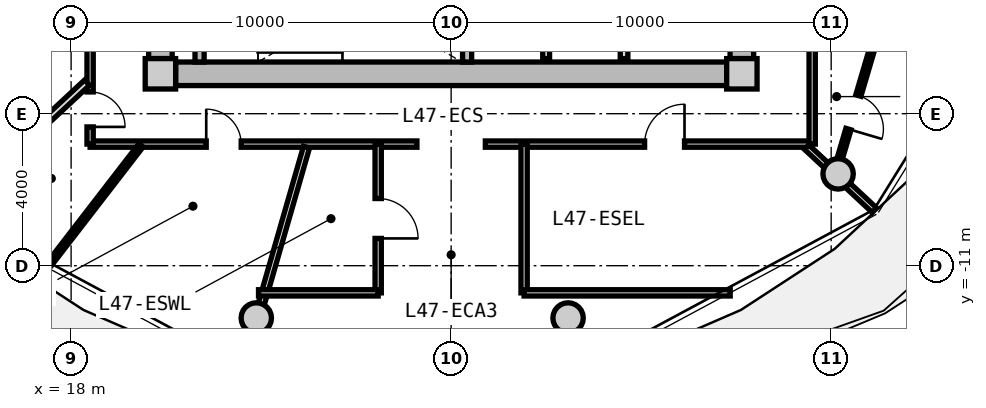
"""IFC4 building model, lengths in metres.
Left out: names, types, materials, properties, quantities, classifications, styles, units other than length and angle.
Written with IfcOpenShell. Run it as: python <this file> out.ifc"""

import sys

from ifc_helpers import new_model, si_unit, direction, frame, frame_2d, origin, origin_2d, place, context, subcontext, project, spatial, rectangle, circle, extrude, source, transform, mapped, element, fill, save


model = new_model("IFC4")
c1 = context("Model", 3, precision=1e-05, world=origin(), true_north=direction((0.0, 1.0)))
c2 = subcontext(c1, "Body", "Model", "MODEL_VIEW")
j1 = project(units=[si_unit("LENGTHUNIT", "METRE"), si_unit("PLANEANGLEUNIT", "RADIAN")], contexts=[c1])
p1 = place(None, origin())
s1 = spatial("IfcSite", under=j1, at=p1, CompositionType="ELEMENT")
p2 = place(p1, origin())
s2 = spatial("IfcBuilding", under=s1, at=p2, CompositionType="ELEMENT")
p3 = place(p2, frame((0.0, 0.0, 152.6)))
s3 = spatial("IfcBuildingStorey", under=s2, at=p3, CompositionType="ELEMENT", Elevation=152.6)
m1 = source(origin(), c2, "Body", "SweptSolid", [
    extrude(rectangle(XDim=0.8, YDim=0.8, at=origin_2d()), origin(), (0.0, 0.0, 1.0), 3.05),
])
for number, where, z_axis, x_axis in (
    (1, (20.35, -5.95, 0.0), (0.0, 0.0, 1.0), (1.0, 0.0, 0.0)),
    (2, (35.65, -5.95, 0.0), (0.0, 0.0, 1.0), (1.0, 0.0, 0.0)),
):
    element("IfcColumn", number, at=place(p3, frame(where, z_axis=z_axis, x_axis=x_axis)), inside=s3, PredefinedType="COLUMN", context=c2, shape_type="MappedRepresentation", body=[
        mapped(m1, transform((0.0, 0.0, 0.0), x_axis=(1.0, 0.0, 0.0), y_axis=(0.0, 1.0, 0.0), z_axis=(0.0, 0.0, 1.0), scale=1.0)),
    ])
m2 = source(origin(), c2, "Body", "SweptSolid", [
    extrude(rectangle(XDim=14.5, YDim=0.62, at=frame_2d((7.25, 0.0))), origin(), (0.0, 0.0, 1.0), 2.81),
])
p4 = place(p3, frame((35.25, -5.95, 0.0), z_axis=(0.0, 0.0, 1.0), x_axis=(-1.0, 0.0, 0.0)))
e3 = element("IfcWall", 3, at=p4, inside=s3, PredefinedType="SHEAR", context=c2, shape_type="MappedRepresentation", body=[
    mapped(m2, transform((0.0, 0.0, 0.0), x_axis=(1.0, 0.0, 0.0), y_axis=(0.0, 1.0, 0.0), z_axis=(0.0, 0.0, 1.0), scale=1.0)),
])
m3 = source(origin(), c2, "Body", "SweptSolid", [
    extrude(rectangle(XDim=11.1, YDim=0.62, at=frame_2d((5.55, 0.0))), origin(), (0.0, 0.0, 1.0), 2.81),
])
p5 = place(p3, frame((20.35, -5.55, 0.0), z_axis=(0.0, 0.0, 1.0), x_axis=(0.0, 1.0, 0.0)))
e4 = element("IfcWall", 4, at=p5, inside=s3, PredefinedType="SHEAR", context=c2, shape_type="MappedRepresentation", body=[
    mapped(m3, transform((0.0, 0.0, 0.0), x_axis=(1.0, 0.0, 0.0), y_axis=(0.0, 1.0, 0.0), z_axis=(0.0, 0.0, 1.0), scale=1.0)),
])
p6 = place(p5, frame((3.8, 0.0, 0.0)))
e5 = element("IfcOpeningElement", 5, at=p6, cuts=e4, PredefinedType="OPENING", context=c2, shape_type="SweptSolid", body=[
    extrude(rectangle(XDim=1.2, YDim=2.15, at=frame_2d((0.6, 1.075))), frame((0.0, 0.32, 0.0), z_axis=(0.0, -1.0, 0.0), x_axis=(1.0, 0.0, 0.0)), (0.0, 0.0, 1.0), 0.64),
])
p7 = place(p3, frame((35.65, 5.55, 0.0), z_axis=(0.0, 0.0, 1.0), x_axis=(0.0, -1.0, 0.0)))
e6 = element("IfcWall", 6, at=p7, inside=s3, PredefinedType="SHEAR", context=c2, shape_type="MappedRepresentation", body=[
    mapped(m3, transform((0.0, 0.0, 0.0), x_axis=(1.0, 0.0, 0.0), y_axis=(0.0, 1.0, 0.0), z_axis=(0.0, 0.0, 1.0), scale=1.0)),
])
p8 = place(p7, frame((5.65, 0.0, 0.0)))
e7 = element("IfcOpeningElement", 7, at=p8, cuts=e6, PredefinedType="OPENING", context=c2, shape_type="SweptSolid", body=[
    extrude(rectangle(XDim=1.2, YDim=2.15, at=frame_2d((0.6, 1.075))), frame((0.0, 0.32, 0.0), z_axis=(0.0, -1.0, 0.0), x_axis=(1.0, 0.0, 0.0)), (0.0, 0.0, 1.0), 0.64),
])
p9 = place(p7, frame((9.3, 0.0, 0.0)))
e8 = element("IfcOpeningElement", 8, at=p9, cuts=e6, PredefinedType="OPENING", context=c2, shape_type="SweptSolid", body=[
    extrude(rectangle(XDim=1.0, YDim=2.1, at=frame_2d((0.5, 1.05))), frame((0.0, 0.32, 0.0), z_axis=(0.0, -1.0, 0.0), x_axis=(1.0, 0.0, 0.0)), (0.0, 0.0, 1.0), 0.64),
])
m4 = source(origin(), c2, "Body", "SweptSolid", [
    extrude(circle(Radius=0.4, at=origin_2d()), origin(), (0.0, 0.0, 1.0), 3.05),
])
for number, where, z_axis, x_axis in (
    (9, (22.873, -12.375, 0.0), (0.0, 0.0, 1.0), (1.0, 0.0, 0.0)),
    (10, (31.077, -12.375, 0.0), (0.0, 0.0, 1.0), (1.0, 0.0, 0.0)),
    (11, (38.183, -8.584, 0.0), (0.0, 0.0, 1.0), (1.0, 0.0, 0.0)),
):
    element("IfcColumn", number, at=place(p3, frame(where, z_axis=z_axis, x_axis=x_axis)), inside=s3, PredefinedType="COLUMN", context=c2, shape_type="MappedRepresentation", body=[
        mapped(m4, transform((0.0, 0.0, 0.0), x_axis=(1.0, 0.0, 0.0), y_axis=(0.0, 1.0, 0.0), z_axis=(0.0, 0.0, 1.0), scale=1.0)),
    ])
m5 = source(origin(), c2, "Body", "SweptSolid", [
    extrude(rectangle(XDim=3.19, YDim=0.24, at=frame_2d((1.595, 0.0))), origin(), (0.0, 0.0, 1.0), 2.81),
])
for number, where, z_axis, x_axis in (
    (12, (21.38, -5.64, 0.0), (0.0, 0.0, 1.0), (0.0, 1.0, 0.0)),
    (13, (28.42, -5.64, 0.0), (0.0, 0.0, 1.0), (0.0, 1.0, 0.0)),
):
    element("IfcWall", number, at=place(p3, frame(where, z_axis=z_axis, x_axis=x_axis)), inside=s3, PredefinedType="PARTITIONING", context=c2, shape_type="MappedRepresentation", body=[
        mapped(m5, transform((0.0, 0.0, 0.0), x_axis=(1.0, 0.0, 0.0), y_axis=(0.0, 1.0, 0.0), z_axis=(0.0, 0.0, 1.0), scale=1.0)),
    ])
m6 = source(origin(), c2, "Body", "SweptSolid", [
    extrude(rectangle(XDim=3.8, YDim=0.2, at=frame_2d((1.9, 0.0))), origin(), (0.0, 0.0, 1.0), 2.795),
])
p10 = place(p3, frame((32.55, -5.55, 0.0), z_axis=(0.0, 0.0, 1.0), x_axis=(0.0, 1.0, 0.0)))
e14 = element("IfcWall", 14, at=p10, inside=s3, PredefinedType="PARTITIONING", context=c2, shape_type="MappedRepresentation", body=[
    mapped(m6, transform((0.0, 0.0, 0.0), x_axis=(1.0, 0.0, 0.0), y_axis=(0.0, 1.0, 0.0), z_axis=(0.0, 0.0, 1.0), scale=1.0)),
])
m7 = source(origin(), c2, "Body", "SweptSolid", [
    extrude(rectangle(XDim=3.22, YDim=0.18, at=frame_2d((1.61, 0.0))), origin(), (0.0, 0.0, 1.0), 2.795),
])
p11 = place(p3, frame((30.5, -5.55, 0.0), z_axis=(0.0, 0.0, 1.0), x_axis=(0.0, 1.0, 0.0)))
e15 = element("IfcWall", 15, at=p11, inside=s3, PredefinedType="PARTITIONING", context=c2, shape_type="MappedRepresentation", body=[
    mapped(m7, transform((0.0, 0.0, 0.0), x_axis=(1.0, 0.0, 0.0), y_axis=(0.0, 1.0, 0.0), z_axis=(0.0, 0.0, 1.0), scale=1.0)),
])
m8 = source(origin(), c2, "Body", "SweptSolid", [
    extrude(rectangle(XDim=8.6, YDim=0.165, at=frame_2d((4.3, 0.0))), origin(), (0.0, 0.0, 1.0), 2.795),
])
p12 = place(p3, frame((37.5, -7.8, 0.0), z_axis=(0.0, 0.0, 1.0), x_axis=(-1.0, 0.0, 0.0)))
e16 = element("IfcWall", 16, at=p12, inside=s3, PredefinedType="PARTITIONING", context=c2, shape_type="MappedRepresentation", body=[
    mapped(m8, transform((0.0, 0.0, 0.0), x_axis=(1.0, 0.0, 0.0), y_axis=(0.0, 1.0, 0.0), z_axis=(0.0, 0.0, 1.0), scale=1.0)),
])
p13 = place(p12, frame((3.359, 0.0, 0.0)))
e17 = element("IfcOpeningElement", 17, at=p13, cuts=e16, PredefinedType="OPENING", context=c2, shape_type="SweptSolid", body=[
    extrude(rectangle(XDim=1.05, YDim=2.15, at=frame_2d((0.525, 1.075))), frame((0.0, 0.093, 0.0), z_axis=(0.0, -1.0, 0.0), x_axis=(1.0, 0.0, 0.0)), (0.0, 0.0, 1.0), 0.185),
])
p14 = place(p3, frame((27.1, -7.8, 0.0), z_axis=(0.0, 0.0, 1.0), x_axis=(-1.0, 0.0, 0.0)))
e18 = element("IfcWall", 18, at=p14, inside=s3, PredefinedType="PARTITIONING", context=c2, shape_type="MappedRepresentation", body=[
    mapped(m8, transform((0.0, 0.0, 0.0), x_axis=(1.0, 0.0, 0.0), y_axis=(0.0, 1.0, 0.0), z_axis=(0.0, 0.0, 1.0), scale=1.0)),
])
p15 = place(p14, frame((4.625, 0.0, 0.0)))
e19 = element("IfcOpeningElement", 19, at=p15, cuts=e18, PredefinedType="OPENING", context=c2, shape_type="SweptSolid", body=[
    extrude(rectangle(XDim=0.92, YDim=2.1, at=frame_2d((0.46, 1.05))), frame((0.0, 0.093, 0.0), z_axis=(0.0, -1.0, 0.0), x_axis=(1.0, 0.0, 0.0)), (0.0, 0.0, 1.0), 0.185),
])
m9 = source(origin(), c2, "Body", "SweptSolid", [
    extrude(rectangle(XDim=15.6, YDim=0.165, at=frame_2d((7.8, 0.0))), origin(), (0.0, 0.0, 1.0), 2.795),
])
p16 = place(p3, frame((18.5, -7.8, 0.0), z_axis=(0.0, 0.0, 1.0), x_axis=(0.0, 1.0, 0.0)))
e20 = element("IfcWall", 20, at=p16, inside=s3, PredefinedType="PARTITIONING", context=c2, shape_type="MappedRepresentation", body=[
    mapped(m9, transform((0.0, 0.0, 0.0), x_axis=(1.0, 0.0, 0.0), y_axis=(0.0, 1.0, 0.0), z_axis=(0.0, 0.0, 1.0), scale=1.0)),
])
p17 = place(p16, frame((12.591, 0.0, 0.0)))
e21 = element("IfcOpeningElement", 21, at=p17, cuts=e20, PredefinedType="OPENING", context=c2, shape_type="SweptSolid", body=[
    extrude(rectangle(XDim=1.05, YDim=2.15, at=frame_2d((0.525, 1.075))), frame((0.0, 0.093, 0.0), z_axis=(0.0, -1.0, 0.0), x_axis=(1.0, 0.0, 0.0)), (0.0, 0.0, 1.0), 0.185),
])
p18 = place(p16, frame((8.081, 0.0, 0.0)))
e22 = element("IfcOpeningElement", 22, at=p18, cuts=e20, PredefinedType="OPENING", context=c2, shape_type="SweptSolid", body=[
    extrude(rectangle(XDim=1.05, YDim=2.15, at=frame_2d((0.525, 1.075))), frame((0.0, 0.093, 0.0), z_axis=(0.0, -1.0, 0.0), x_axis=(1.0, 0.0, 0.0)), (0.0, 0.0, 1.0), 0.185),
])
p19 = place(p16, frame((2.854, 0.0, 0.0)))
e23 = element("IfcOpeningElement", 23, at=p19, cuts=e20, PredefinedType="OPENING", context=c2, shape_type="SweptSolid", body=[
    extrude(rectangle(XDim=1.05, YDim=2.15, at=frame_2d((0.525, 1.075))), frame((0.0, 0.093, 0.0), z_axis=(0.0, -1.0, 0.0), x_axis=(1.0, 0.0, 0.0)), (0.0, 0.0, 1.0), 0.185),
])
p20 = place(p16, frame((0.452, 0.0, 0.0)))
e24 = element("IfcOpeningElement", 24, at=p20, cuts=e20, PredefinedType="OPENING", context=c2, shape_type="SweptSolid", body=[
    extrude(rectangle(XDim=0.92, YDim=2.1, at=frame_2d((0.46, 1.05))), frame((0.0, 0.093, 0.0), z_axis=(0.0, -1.0, 0.0), x_axis=(1.0, 0.0, 0.0)), (0.0, 0.0, 1.0), 0.185),
])
p21 = place(p3, frame((37.5, 7.8, 0.0), z_axis=(0.0, 0.0, 1.0), x_axis=(0.0, -1.0, 0.0)))
e25 = element("IfcWall", 25, at=p21, inside=s3, PredefinedType="PARTITIONING", context=c2, shape_type="MappedRepresentation", body=[
    mapped(m9, transform((0.0, 0.0, 0.0), x_axis=(1.0, 0.0, 0.0), y_axis=(0.0, 1.0, 0.0), z_axis=(0.0, 0.0, 1.0), scale=1.0)),
])
p22 = place(p21, frame((9.896, 0.0, 0.0)))
e26 = element("IfcOpeningElement", 26, at=p22, cuts=e25, PredefinedType="OPENING", context=c2, shape_type="SweptSolid", body=[
    extrude(rectangle(XDim=1.05, YDim=2.15, at=frame_2d((0.525, 1.075))), frame((0.0, 0.093, 0.0), z_axis=(0.0, -1.0, 0.0), x_axis=(1.0, 0.0, 0.0)), (0.0, 0.0, 1.0), 0.185),
])
p23 = place(p21, frame((4.306, 0.0, 0.0)))
e27 = element("IfcOpeningElement", 27, at=p23, cuts=e25, PredefinedType="OPENING", context=c2, shape_type="SweptSolid", body=[
    extrude(rectangle(XDim=1.05, YDim=2.15, at=frame_2d((0.525, 1.075))), frame((0.0, 0.093, 0.0), z_axis=(0.0, -1.0, 0.0), x_axis=(1.0, 0.0, 0.0)), (0.0, 0.0, 1.0), 0.185),
])
m10 = source(origin(), c2, "Body", "SweptSolid", [
    extrude(rectangle(XDim=6.035, YDim=0.165, at=frame_2d((3.018, 0.0))), origin(), (0.0, 0.0, 1.0), 2.345),
])
p24 = place(p3, frame((24.194, -7.88, 0.0), z_axis=(0.0, 0.0, 1.0), x_axis=(-0.276809454862, -0.960924828329, 0.0)))
e28 = element("IfcWall", 28, at=p24, inside=s3, PredefinedType="PARTITIONING", context=c2, shape_type="MappedRepresentation", body=[
    mapped(m10, transform((0.0, 0.0, 0.0), x_axis=(1.0, 0.0, 0.0), y_axis=(0.0, 1.0, 0.0), z_axis=(0.0, 0.0, 1.0), scale=1.0)),
])
m11 = source(origin(), c2, "Body", "SweptSolid", [
    extrude(rectangle(XDim=2.435, YDim=0.165, at=frame_2d((1.217, 0.0))), origin(), (0.0, 0.0, 1.0), 2.345),
])
p25 = place(p3, frame((37.354, -7.88, 0.0), z_axis=(0.0, 0.0, 1.0), x_axis=(0.732164643118, -0.681127693878, 0.0)))
e29 = element("IfcWall", 29, at=p25, inside=s3, PredefinedType="PARTITIONING", context=c2, shape_type="MappedRepresentation", body=[
    mapped(m11, transform((0.0, 0.0, 0.0), x_axis=(1.0, 0.0, 0.0), y_axis=(0.0, 1.0, 0.0), z_axis=(0.0, 0.0, 1.0), scale=1.0)),
])
m12 = source(origin(), c2, "Body", "SweptSolid", [
    extrude(rectangle(XDim=3.915, YDim=0.165, at=frame_2d((1.957, 0.0))), origin(), (0.0, 0.0, 1.0), 2.795),
])
p26 = place(p3, frame((26.08, -11.715, 0.0), z_axis=(0.0, 0.0, 1.0), x_axis=(0.0, 1.0, 0.0)))
e30 = element("IfcWall", 30, at=p26, inside=s3, PredefinedType="PARTITIONING", context=c2, shape_type="MappedRepresentation", body=[
    mapped(m12, transform((0.0, 0.0, 0.0), x_axis=(1.0, 0.0, 0.0), y_axis=(0.0, 1.0, 0.0), z_axis=(0.0, 0.0, 1.0), scale=1.0)),
])
p27 = place(p26, frame((1.432, 0.0, 0.0)))
e31 = element("IfcOpeningElement", 31, at=p27, cuts=e30, PredefinedType="OPENING", context=c2, shape_type="SweptSolid", body=[
    extrude(rectangle(XDim=1.05, YDim=2.15, at=frame_2d((0.525, 1.075))), frame((0.0, 0.093, 0.0), z_axis=(0.0, -1.0, 0.0), x_axis=(1.0, 0.0, 0.0)), (0.0, 0.0, 1.0), 0.185),
])
m13 = source(origin(), c2, "Body", "SweptSolid", [
    extrude(rectangle(XDim=3.149, YDim=0.165, at=frame_2d((1.574, 0.0))), origin(), (0.0, 0.0, 1.0), 2.795),
])
p28 = place(p3, frame((22.931, -11.715, 0.0), z_axis=(0.0, 0.0, 1.0), x_axis=(1.0, 0.0, 0.0)))
e32 = element("IfcWall", 32, at=p28, inside=s3, PredefinedType="PARTITIONING", context=c2, shape_type="MappedRepresentation", body=[
    mapped(m13, transform((0.0, 0.0, 0.0), x_axis=(1.0, 0.0, 0.0), y_axis=(0.0, 1.0, 0.0), z_axis=(0.0, 0.0, 1.0), scale=1.0)),
])
m14 = source(origin(), c2, "Body", "SweptSolid", [
    extrude(rectangle(XDim=3.915, YDim=0.165, at=frame_2d((1.957, 0.0))), origin(), (0.0, 0.0, 1.0), 2.345),
])
p29 = place(p3, frame((29.92, -11.715, 0.0), z_axis=(0.0, 0.0, 1.0), x_axis=(0.0, 1.0, 0.0)))
e33 = element("IfcWall", 33, at=p29, inside=s3, PredefinedType="PARTITIONING", context=c2, shape_type="MappedRepresentation", body=[
    mapped(m14, transform((0.0, 0.0, 0.0), x_axis=(1.0, 0.0, 0.0), y_axis=(0.0, 1.0, 0.0), z_axis=(0.0, 0.0, 1.0), scale=1.0)),
])
m15 = source(origin(), c2, "Body", "SweptSolid", [
    extrude(rectangle(XDim=5.423, YDim=0.165, at=frame_2d((2.712, 0.0))), origin(), (0.0, 0.0, 1.0), 2.795),
])
p30 = place(p3, frame((29.92, -11.715, 0.0), z_axis=(0.0, 0.0, 1.0), x_axis=(1.0, 0.0, 0.0)))
e34 = element("IfcWall", 34, at=p30, inside=s3, PredefinedType="PARTITIONING", context=c2, shape_type="MappedRepresentation", body=[
    mapped(m15, transform((0.0, 0.0, 0.0), x_axis=(1.0, 0.0, 0.0), y_axis=(0.0, 1.0, 0.0), z_axis=(0.0, 0.0, 1.0), scale=1.0)),
])
m16 = source(origin(), c2, "Body", "SweptSolid", [
    extrude(rectangle(XDim=4.927, YDim=0.19, at=frame_2d((2.463, 0.0))), origin(), (0.0, 0.0, 1.0), 2.345),
])
p31 = place(p3, frame((18.42, -6.183, 0.0), z_axis=(0.0, 0.0, 1.0), x_axis=(-0.732191335987, -0.681098999783, 0.0)))
e35 = element("IfcWall", 35, at=p31, inside=s3, PredefinedType="PARTITIONING", context=c2, shape_type="MappedRepresentation", body=[
    mapped(m16, transform((0.0, 0.0, 0.0), x_axis=(1.0, 0.0, 0.0), y_axis=(0.0, 1.0, 0.0), z_axis=(0.0, 0.0, 1.0), scale=1.0)),
])
m17 = source(origin(), c2, "Body", "SweptSolid", [
    extrude(rectangle(XDim=3.937, YDim=0.14, at=frame_2d((1.968, 0.0))), origin(), (0.0, 0.0, 1.0), 2.795),
])
p32 = place(p3, frame((19.84, -7.83, 0.0), z_axis=(0.0, 0.0, 1.0), x_axis=(-0.611055586441, -0.79158768957, 0.0)))
e36 = element("IfcWall", 36, at=p32, inside=s3, PredefinedType="PARTITIONING", context=c2, shape_type="MappedRepresentation", body=[
    mapped(m17, transform((0.0, 0.0, 0.0), x_axis=(1.0, 0.0, 0.0), y_axis=(0.0, 1.0, 0.0), z_axis=(0.0, 0.0, 1.0), scale=1.0)),
])
m18 = source(origin(), c2, "Body", "SweptSolid", [
    extrude(rectangle(XDim=3.47, YDim=0.14, at=frame_2d((1.735, 0.0))), origin(), (0.0, 0.0, 1.0), 2.795),
])
p33 = place(p3, frame((39.076, -5.3, 0.0), z_axis=(0.0, 0.0, 1.0), x_axis=(-0.283194656898, -0.959062451723, 0.0)))
e37 = element("IfcWall", 37, at=p33, inside=s3, PredefinedType="PARTITIONING", context=c2, shape_type="MappedRepresentation", body=[
    mapped(m18, transform((0.0, 0.0, 0.0), x_axis=(1.0, 0.0, 0.0), y_axis=(0.0, 1.0, 0.0), z_axis=(0.0, 0.0, 1.0), scale=1.0)),
])
p34 = place(p33, frame((1.275, 0.0, 0.0)))
e38 = element("IfcOpeningElement", 38, at=p34, cuts=e37, PredefinedType="OPENING", context=c2, shape_type="SweptSolid", body=[
    extrude(rectangle(XDim=0.92, YDim=2.1, at=frame_2d((0.46, 1.05))), frame((0.0, 0.08, 0.0), z_axis=(0.0, -1.0, 0.0), x_axis=(1.0, 0.0, 0.0)), (0.0, 0.0, 1.0), 0.16),
])
m19 = source(origin(), c2, "Body", "SweptSolid", [
    extrude(rectangle(XDim=1.05, YDim=2.15, at=frame_2d((0.525, 1.075))), frame((0.0, 0.025, 0.0), z_axis=(0.0, -1.0, 0.0), x_axis=(1.0, 0.0, 0.0)), (0.0, 0.0, 1.0), 0.05),
])
p35 = place(p27, frame((1.05, 0.0, 0.0), z_axis=(0.0, 0.0, 1.0), x_axis=(-1.0, 0.0, 0.0)))
e39 = element("IfcDoor", 39, at=p35, inside=s3, OperationType="SINGLE_SWING_RIGHT", PredefinedType="DOOR", context=c2, shape_type="MappedRepresentation", body=[
    mapped(m19, transform((0.0, 0.0, 0.0), x_axis=(1.0, 0.0, 0.0), y_axis=(0.0, 1.0, 0.0), z_axis=(0.0, 0.0, 1.0), scale=1.0)),
])
fill(e31, e39)
p36 = place(p13, frame((1.05, 0.0, 0.0), z_axis=(0.0, 0.0, 1.0), x_axis=(-1.0, 0.0, 0.0)))
e40 = element("IfcDoor", 40, at=p36, inside=s3, OperationType="SINGLE_SWING_RIGHT", PredefinedType="DOOR", context=c2, shape_type="MappedRepresentation", body=[
    mapped(m19, transform((0.0, 0.0, 0.0), x_axis=(1.0, 0.0, 0.0), y_axis=(0.0, 1.0, 0.0), z_axis=(0.0, 0.0, 1.0), scale=1.0)),
])
fill(e17, e40)
m20 = source(origin(), c2, "Body", "SweptSolid", [
    extrude(rectangle(XDim=0.92, YDim=2.1, at=frame_2d((0.46, 1.05))), frame((0.0, 0.025, 0.0), z_axis=(0.0, -1.0, 0.0), x_axis=(1.0, 0.0, 0.0)), (0.0, 0.0, 1.0), 0.05),
])
p37 = place(p20, frame((0.92, 0.0, 0.0), z_axis=(0.0, 0.0, 1.0), x_axis=(-1.0, 0.0, 0.0)))
e41 = element("IfcDoor", 41, at=p37, inside=s3, OperationType="SINGLE_SWING_RIGHT", PredefinedType="DOOR", context=c2, shape_type="MappedRepresentation", body=[
    mapped(m20, transform((0.0, 0.0, 0.0), x_axis=(1.0, 0.0, 0.0), y_axis=(0.0, 1.0, 0.0), z_axis=(0.0, 0.0, 1.0), scale=1.0)),
])
fill(e24, e41)
p38 = place(p15, frame((0.92, 0.0, 0.0), z_axis=(0.0, 0.0, 1.0), x_axis=(-1.0, 0.0, 0.0)))
e42 = element("IfcDoor", 42, at=p38, inside=s3, OperationType="SINGLE_SWING_LEFT", PredefinedType="DOOR", context=c2, shape_type="MappedRepresentation", body=[
    mapped(m20, transform((0.0, 0.0, 0.0), x_axis=(1.0, 0.0, 0.0), y_axis=(0.0, 1.0, 0.0), z_axis=(0.0, 0.0, 1.0), scale=1.0)),
])
fill(e19, e42)
p39 = place(p34, origin())
e43 = element("IfcDoor", 43, at=p39, inside=s3, OperationType="SINGLE_SWING_RIGHT", PredefinedType="DOOR", context=c2, shape_type="MappedRepresentation", body=[
    mapped(m20, transform((0.0, 0.0, 0.0), x_axis=(1.0, 0.0, 0.0), y_axis=(0.0, 1.0, 0.0), z_axis=(0.0, 0.0, 1.0), scale=1.0)),
])
fill(e38, e43)
save(model, sys.argv[1])
